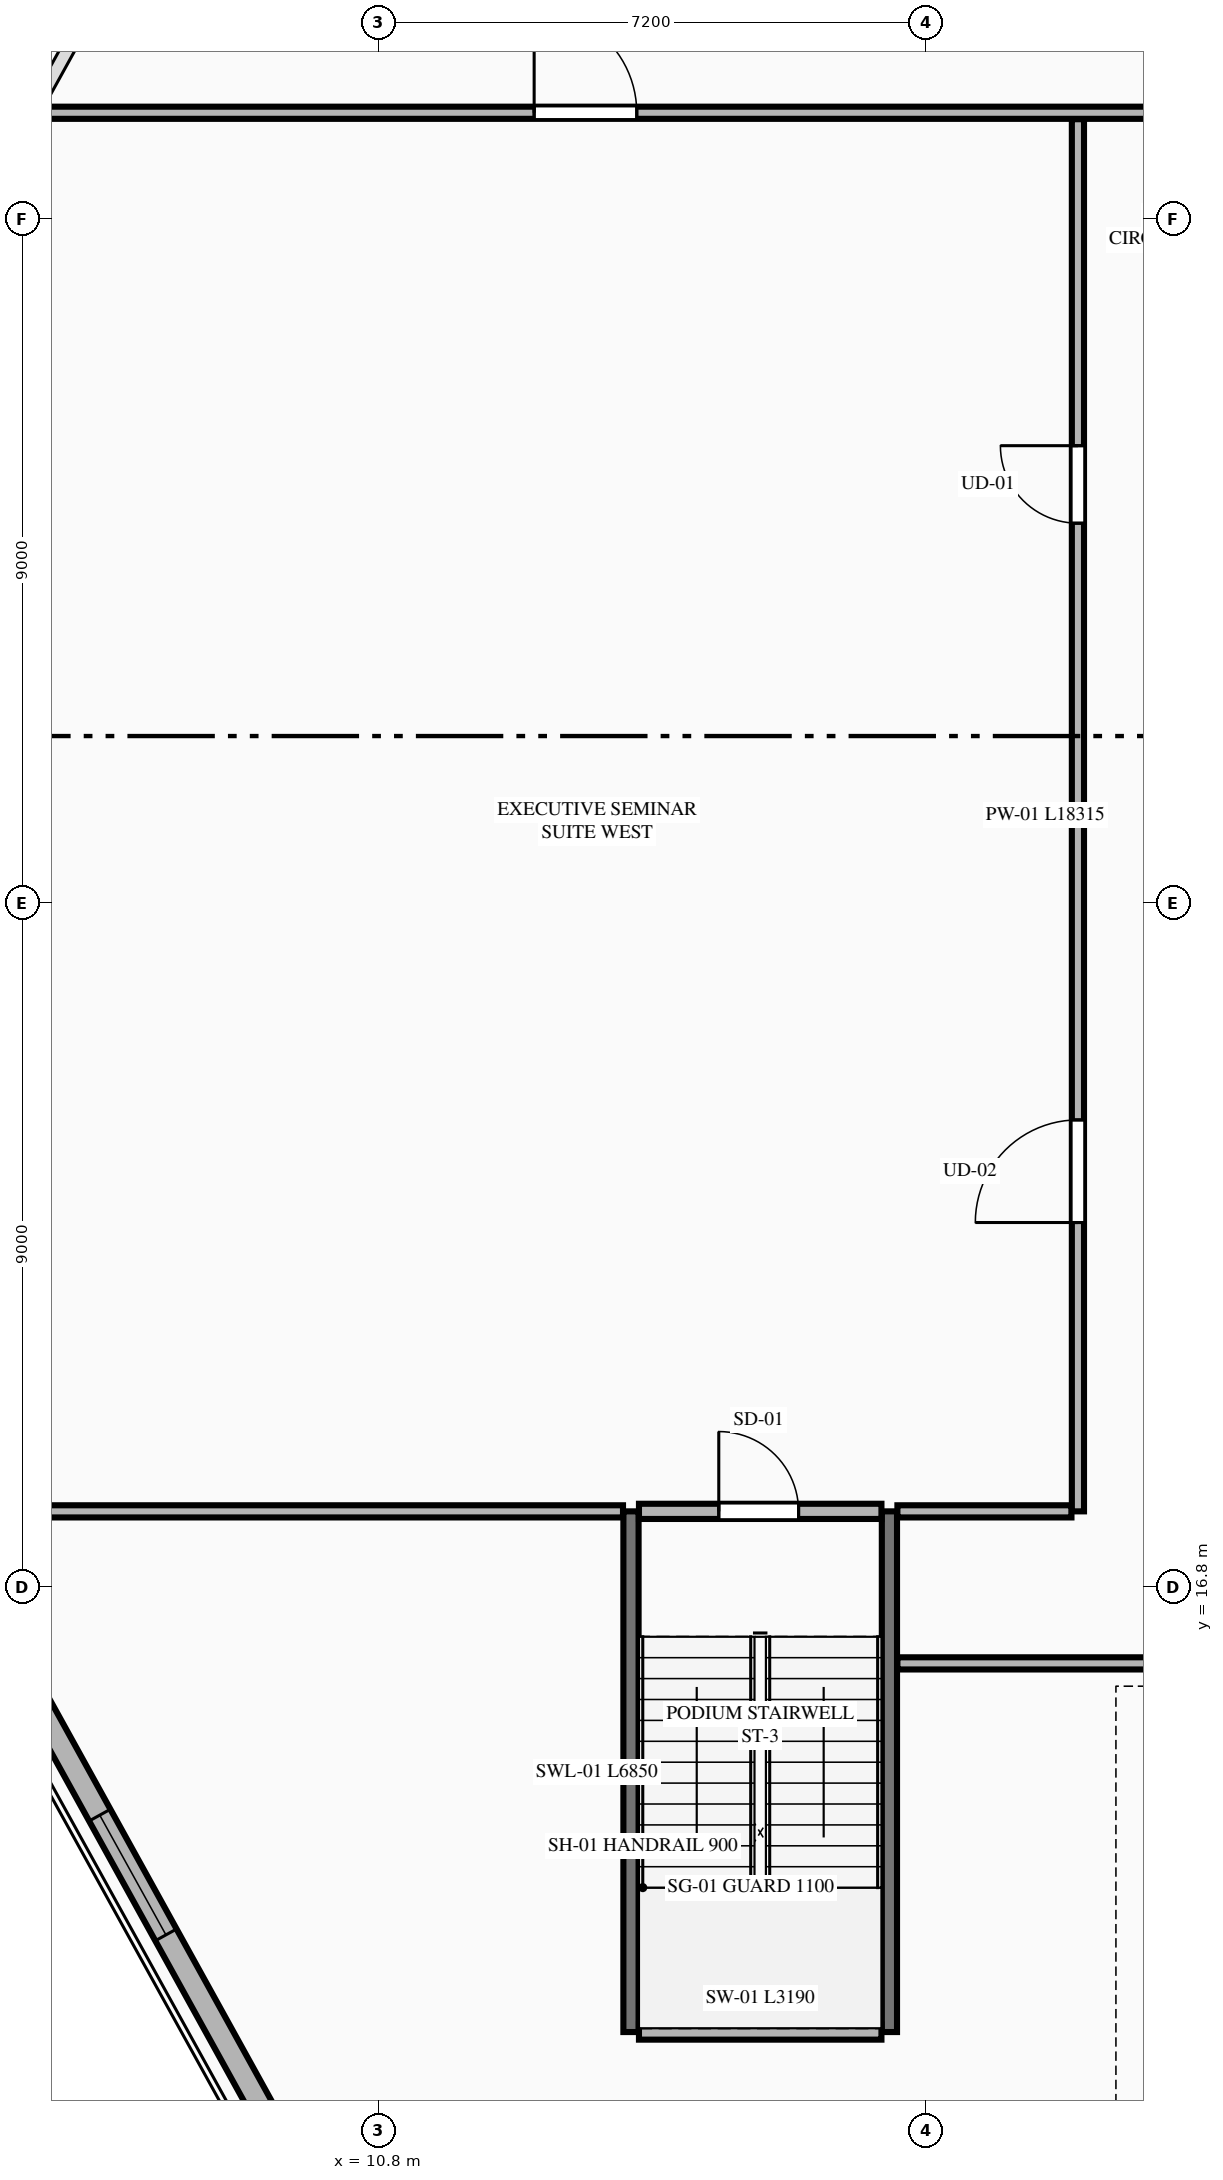
"""IFC4 building model, lengths in metres.
Left out: names, types, materials, properties, quantities, classifications, styles, units other than length and angle.
Written with IfcOpenShell. Run it as: python <this file> out.ifc"""

import sys

from ifc_helpers import new_model, si_unit, direction, frame, frame_2d, origin, place, context, subcontext, project, spatial, rectangle, extrude, element, fill, save


model = new_model("IFC4")
c1 = context("Model", 3, precision=1e-05, world=origin(), true_north=direction((0.0, 1.0)))
c2 = subcontext(c1, "Body", "Model", "MODEL_VIEW")
j1 = project(units=[si_unit("LENGTHUNIT", "METRE"), si_unit("PLANEANGLEUNIT", "RADIAN")], contexts=[c1])
p1 = place(None, origin())
s1 = spatial("IfcSite", under=j1, at=p1, CompositionType="ELEMENT")
p2 = place(p1, origin())
s2 = spatial("IfcBuilding", under=s1, at=p2, CompositionType="ELEMENT")
p3 = place(p2, frame((0.0, 0.0, 6.0)))
s3 = spatial("IfcBuildingStorey", under=s2, at=p3, CompositionType="ELEMENT", Elevation=6.0)
for number, where, z_axis, x_axis in (
    (1, (14.12, 10.95, 0.0), (0.0, 0.0, 1.0), (0.0, 1.0, 0.0)),
    (2, (17.52, 10.95, 0.0), (0.0, 0.0, 1.0), (0.0, 1.0, 0.0)),
):
    element("IfcWall", number, at=place(p3, frame(where, z_axis=z_axis, x_axis=x_axis)), inside=s3, PredefinedType="SHEAR", context=c2, shape_type="SweptSolid", body=[
        extrude(rectangle(XDim=6.85, YDim=0.2, at=frame_2d((3.425, 0.0))), origin(), (0.0, 0.0, 1.0), 4.5),
    ])
p4 = place(p3, frame((14.225, 10.95, 0.0), z_axis=(0.0, 0.0, 1.0), x_axis=(1.0, 0.0, 0.0)))
e3 = element("IfcWall", 3, at=p4, inside=s3, PredefinedType="PLUMBINGWALL", context=c2, shape_type="SweptSolid", body=[
    extrude(rectangle(XDim=3.19, YDim=0.2, at=frame_2d((1.595, 0.0))), origin(), (0.0, 0.0, 1.0), 4.25),
])
p5 = place(p3, frame((14.225, 17.8, 0.0), z_axis=(0.0, 0.0, 1.0), x_axis=(1.0, 0.0, 0.0)))
e4 = element("IfcWall", 4, at=p5, inside=s3, PredefinedType="PLUMBINGWALL", context=c2, shape_type="SweptSolid", body=[
    extrude(rectangle(XDim=3.19, YDim=0.2, at=frame_2d((1.595, 0.0))), origin(), (0.0, 0.0, 1.0), 4.25),
])
p6 = place(p5, frame((1.05, 0.0, 0.0)))
e5 = element("IfcOpeningElement", 5, at=p6, cuts=e4, PredefinedType="OPENING", context=c2, shape_type="SweptSolid", body=[
    extrude(rectangle(XDim=1.05, YDim=2.15, at=frame_2d((0.525, 1.075))), frame((0.0, 0.11, 0.0), z_axis=(0.0, -1.0, 0.0), x_axis=(1.0, 0.0, 0.0)), (0.0, 0.0, 1.0), 0.22),
])
p7 = place(p3, frame((17.625, 15.8, 0.0), z_axis=(0.0, 0.0, 1.0), x_axis=(1.0, 0.0, 0.0)))
e6 = element("IfcWall", 6, at=p7, inside=s3, PredefinedType="PARTITIONING", context=c2, shape_type="SweptSolid", body=[
    extrude(rectangle(XDim=29.59, YDim=0.16, at=frame_2d((14.795, 0.0))), origin(), (0.0, 0.0, 1.0), 4.25),
])
p8 = place(p7, frame((3.5, 0.0, 0.0)))
e7 = element("IfcOpeningElement", 7, at=p8, cuts=e6, PredefinedType="OPENING", context=c2, shape_type="SweptSolid", body=[
    extrude(rectangle(XDim=1.35, YDim=2.35, at=frame_2d((0.675, 1.175))), frame((0.0, 0.09, 0.0), z_axis=(0.0, -1.0, 0.0), x_axis=(1.0, 0.0, 0.0)), (0.0, 0.0, 1.0), 0.18),
])
p9 = place(p7, frame((24.5, 0.0, 0.0)))
e8 = element("IfcOpeningElement", 8, at=p9, cuts=e6, PredefinedType="OPENING", context=c2, shape_type="SweptSolid", body=[
    extrude(rectangle(XDim=1.35, YDim=2.35, at=frame_2d((0.675, 1.175))), frame((0.0, 0.09, 0.0), z_axis=(0.0, -1.0, 0.0), x_axis=(1.0, 0.0, 0.0)), (0.0, 0.0, 1.0), 0.18),
])
p10 = place(p3, frame((17.625, 17.8, 0.0), z_axis=(0.0, 0.0, 1.0), x_axis=(1.0, 0.0, 0.0)))
e9 = element("IfcWall", 9, at=p10, inside=s3, PredefinedType="PARTITIONING", context=c2, shape_type="SweptSolid", body=[
    extrude(rectangle(XDim=2.29, YDim=0.16, at=frame_2d((1.145, 0.0))), origin(), (0.0, 0.0, 1.0), 4.25),
])
p11 = place(p3, frame((5.02, 17.8, 0.0), z_axis=(0.0, 0.0, 1.0), x_axis=(1.0, 0.0, 0.0)))
e10 = element("IfcWall", 10, at=p11, inside=s3, PredefinedType="PARTITIONING", context=c2, shape_type="SweptSolid", body=[
    extrude(rectangle(XDim=8.995, YDim=0.16, at=frame_2d((4.498, 0.0))), origin(), (0.0, 0.0, 1.0), 4.25),
])
p12 = place(p3, frame((20.0, 17.8, 0.0), z_axis=(0.0, 0.0, 1.0), x_axis=(0.0, 1.0, 0.0)))
e11 = element("IfcWall", 11, at=p12, inside=s3, PredefinedType="PARTITIONING", context=c2, shape_type="SweptSolid", body=[
    extrude(rectangle(XDim=18.315, YDim=0.16, at=frame_2d((9.157, 0.0))), origin(), (0.0, 0.0, 1.0), 4.25),
])
p13 = place(p12, frame((3.8, 0.0, 0.0)))
e12 = element("IfcOpeningElement", 12, at=p13, cuts=e11, PredefinedType="OPENING", context=c2, shape_type="SweptSolid", body=[
    extrude(rectangle(XDim=1.35, YDim=2.35, at=frame_2d((0.675, 1.175))), frame((0.0, 0.09, 0.0), z_axis=(0.0, -1.0, 0.0), x_axis=(1.0, 0.0, 0.0)), (0.0, 0.0, 1.0), 0.18),
])
p14 = place(p12, frame((13.0, 0.0, 0.0)))
e13 = element("IfcOpeningElement", 13, at=p14, cuts=e11, PredefinedType="OPENING", context=c2, shape_type="SweptSolid", body=[
    extrude(rectangle(XDim=1.02, YDim=2.25, at=frame_2d((0.51, 1.125))), frame((0.0, 0.09, 0.0), z_axis=(0.0, -1.0, 0.0), x_axis=(1.0, 0.0, 0.0)), (0.0, 0.0, 1.0), 0.18),
])
p15 = place(p3, frame((6.346, 36.2, 0.0), z_axis=(0.0, 0.0, 1.0), x_axis=(1.0, 0.0, 0.0)))
e14 = element("IfcWall", 14, at=p15, inside=s3, PredefinedType="PARTITIONING", context=c2, shape_type="SweptSolid", body=[
    extrude(rectangle(XDim=52.108, YDim=0.16, at=frame_2d((26.054, 0.0))), origin(), (0.0, 0.0, 1.0), 4.25),
])
p16 = place(p15, frame((6.5, 0.0, 0.0)))
e15 = element("IfcOpeningElement", 15, at=p16, cuts=e14, PredefinedType="OPENING", context=c2, shape_type="SweptSolid", body=[
    extrude(rectangle(XDim=1.35, YDim=2.35, at=frame_2d((0.675, 1.175))), frame((0.0, 0.09, 0.0), z_axis=(0.0, -1.0, 0.0), x_axis=(1.0, 0.0, 0.0)), (0.0, 0.0, 1.0), 0.18),
])
p17 = place(p15, frame((26.5, 0.0, 0.0)))
e16 = element("IfcOpeningElement", 16, at=p17, cuts=e14, PredefinedType="OPENING", context=c2, shape_type="SweptSolid", body=[
    extrude(rectangle(XDim=1.35, YDim=2.35, at=frame_2d((0.675, 1.175))), frame((0.0, 0.09, 0.0), z_axis=(0.0, -1.0, 0.0), x_axis=(1.0, 0.0, 0.0)), (0.0, 0.0, 1.0), 0.18),
])
p18 = place(p3, frame((4.419, 18.711, 0.0), z_axis=(0.0, 0.0, 1.0), x_axis=(0.483698591046, -0.875234638837, 0.0)))
e17 = element("IfcWall", 17, at=p18, inside=s3, PredefinedType="STANDARD", context=c2, shape_type="SweptSolid", body=[
    extrude(rectangle(XDim=13.015, YDim=0.32, at=frame_2d((6.507, 0.0))), origin(), (0.0, 0.0, 1.0), 4.25),
])
p19 = place(p18, frame((5.607, 0.0, 0.75)))
e18 = element("IfcOpeningElement", 18, at=p19, cuts=e17, PredefinedType="OPENING", context=c2, shape_type="SweptSolid", body=[
    extrude(rectangle(XDim=1.8, YDim=2.4, at=frame_2d((0.9, 1.2))), frame((0.0, 0.17, 0.0), z_axis=(0.0, -1.0, 0.0), x_axis=(1.0, 0.0, 0.0)), (0.0, 0.0, 1.0), 0.34),
])
p20 = place(p6, origin())
e19 = element("IfcDoor", 19, at=p20, inside=s3, OperationType="SINGLE_SWING_LEFT", PredefinedType="DOOR", context=c2, shape_type="SweptSolid", body=[
    extrude(rectangle(XDim=1.05, YDim=2.15, at=frame_2d((0.525, 1.075))), frame((0.0, 0.025, 0.0), z_axis=(0.0, -1.0, 0.0), x_axis=(1.0, 0.0, 0.0)), (0.0, 0.0, 1.0), 0.05),
])
fill(e5, e19)
p21 = place(p13, origin())
e20 = element("IfcDoor", 20, at=p21, inside=s3, OperationType="SINGLE_SWING_LEFT", PredefinedType="DOOR", context=c2, shape_type="SweptSolid", body=[
    extrude(rectangle(XDim=1.35, YDim=2.35, at=frame_2d((0.675, 1.175))), frame((0.0, 0.025, 0.0), z_axis=(0.0, -1.0, 0.0), x_axis=(1.0, 0.0, 0.0)), (0.0, 0.0, 1.0), 0.05),
])
fill(e12, e20)
p22 = place(p14, origin())
e21 = element("IfcDoor", 21, at=p22, inside=s3, OperationType="SINGLE_SWING_RIGHT", PredefinedType="DOOR", context=c2, shape_type="SweptSolid", body=[
    extrude(rectangle(XDim=1.02, YDim=2.25, at=frame_2d((0.51, 1.125))), frame((0.0, 0.025, 0.0), z_axis=(0.0, -1.0, 0.0), x_axis=(1.0, 0.0, 0.0)), (0.0, 0.0, 1.0), 0.05),
])
fill(e13, e21)
p23 = place(p16, origin())
e22 = element("IfcDoor", 22, at=p23, inside=s3, OperationType="SINGLE_SWING_LEFT", PredefinedType="DOOR", context=c2, shape_type="SweptSolid", body=[
    extrude(rectangle(XDim=1.35, YDim=2.35, at=frame_2d((0.675, 1.175))), frame((0.0, 0.025, 0.0), z_axis=(0.0, -1.0, 0.0), x_axis=(1.0, 0.0, 0.0)), (0.0, 0.0, 1.0), 0.05),
])
fill(e15, e22)
p24 = place(p19, origin())
e23 = element("IfcWindow", 23, at=p24, inside=s3, PartitioningType="SINGLE_PANEL", PredefinedType="WINDOW", context=c2, shape_type="SweptSolid", body=[
    extrude(rectangle(XDim=1.8, YDim=2.4, at=frame_2d((0.9, 1.2))), frame((0.0, 0.03, 0.0), z_axis=(0.0, -1.0, 0.0), x_axis=(1.0, 0.0, 0.0)), (0.0, 0.0, 1.0), 0.06),
])
fill(e18, e23)
save(model, sys.argv[1])
